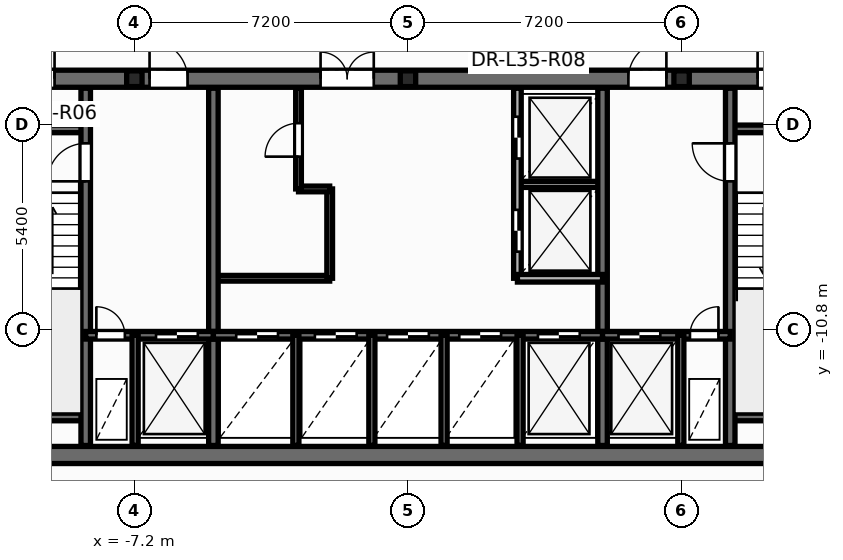
"""IFC4 building model, lengths in metres.
Left out: names, types, materials, properties, quantities, classifications, styles, units other than length and angle.
Written with IfcOpenShell. Run it as: python <this file> out.ifc"""

import sys

from ifc_helpers import new_model, si_unit, direction, frame, frame_2d, origin, origin_2d, place, context, subcontext, project, spatial, rectangle, i_section, extrude, element, fill, save


model = new_model("IFC4")
c1 = context("Model", 3, precision=1e-05, world=origin(), true_north=direction((0.0, 1.0)))
c2 = subcontext(c1, "Body", "Model", "MODEL_VIEW")
j1 = project(units=[si_unit("LENGTHUNIT", "METRE"), si_unit("PLANEANGLEUNIT", "RADIAN")], contexts=[c1])
p1 = place(None, origin())
s1 = spatial("IfcSite", under=j1, at=p1, CompositionType="ELEMENT")
p2 = place(p1, origin())
s2 = spatial("IfcBuilding", under=s1, at=p2, CompositionType="ELEMENT")
p3 = place(p2, frame((0.0, 0.0, 136.5)))
s3 = spatial("IfcBuildingStorey", under=s2, at=p3, CompositionType="ELEMENT", Elevation=136.5)
for number, where, z_axis, x_axis in (
    (1, (-7.2, -4.2, 0.0), (0.0, 0.0, 1.0), (1.0, 0.0, 0.0)),
    (2, (0.0, -4.2, 0.0), (0.0, 0.0, 1.0), (1.0, 0.0, 0.0)),
    (3, (7.2, -4.2, 0.0), (0.0, 0.0, 1.0), (1.0, 0.0, 0.0)),
):
    element("IfcColumn", number, at=place(p3, frame(where, z_axis=z_axis, x_axis=x_axis)), inside=s3, PredefinedType="PILASTER", context=c2, shape_type="SweptSolid", body=[
        extrude(i_section(OverallWidth=0.405, OverallDepth=0.414, WebThickness=0.022, FlangeThickness=0.032, at=origin_2d()), origin(), (0.0, 0.0, 1.0), 3.6),
    ])
p4 = place(p3, frame((-5.12, -9.45, 0.0), z_axis=(0.0, 0.0, 1.0), x_axis=(1.0, 0.0, 0.0)))
e4 = element("IfcWall", 4, at=p4, inside=s3, PredefinedType="PARTITIONING", context=c2, shape_type="SweptSolid", body=[
    extrude(rectangle(XDim=3.06, YDim=0.15, at=frame_2d((1.53, 0.0))), origin(), (0.0, 0.0, 1.0), 3.35),
])
p5 = place(p3, frame((-2.06, -9.45, 0.0), z_axis=(0.0, 0.0, 1.0), x_axis=(0.0, 1.0, 0.0)))
e5 = element("IfcWall", 5, at=p5, inside=s3, PredefinedType="PARTITIONING", context=c2, shape_type="SweptSolid", body=[
    extrude(rectangle(XDim=2.35, YDim=0.15, at=frame_2d((1.175, 0.0))), origin(), (0.0, 0.0, 1.0), 3.35),
])
p6 = place(p3, frame((-2.88, -7.1, 0.0), z_axis=(0.0, 0.0, 1.0), x_axis=(1.0, 0.0, 0.0)))
e6 = element("IfcWall", 6, at=p6, inside=s3, PredefinedType="PARTITIONING", context=c2, shape_type="SweptSolid", body=[
    extrude(rectangle(XDim=0.82, YDim=0.15, at=frame_2d((0.41, 0.0))), origin(), (0.0, 0.0, 1.0), 3.35),
])
p7 = place(p3, frame((-2.88, -7.1, 0.0), z_axis=(0.0, 0.0, 1.0), x_axis=(0.0, 1.0, 0.0)))
e7 = element("IfcWall", 7, at=p7, inside=s3, PredefinedType="PARTITIONING", context=c2, shape_type="SweptSolid", body=[
    extrude(rectangle(XDim=2.65, YDim=0.15, at=frame_2d((1.325, 0.0))), origin(), (0.0, 0.0, 1.0), 3.35),
])
p8 = place(p7, frame((0.85, 0.0, 0.0)))
e8 = element("IfcOpeningElement", 8, at=p8, cuts=e7, PredefinedType="OPENING", context=c2, shape_type="SweptSolid", body=[
    extrude(rectangle(XDim=0.886, YDim=2.104, at=frame_2d((0.44, 1.052))), frame((0.0, 0.085, 0.0), z_axis=(0.0, -1.0, 0.0), x_axis=(1.0, 0.0, 0.0)), (0.0, 0.0, 1.0), 0.17),
])
p9 = place(p3, frame((2.88, -6.98, 0.0), z_axis=(0.0, 0.0, 1.0), x_axis=(1.0, 0.0, 0.0)))
e9 = element("IfcWall", 9, at=p9, inside=s3, PredefinedType="PARTITIONING", context=c2, shape_type="SweptSolid", body=[
    extrude(rectangle(XDim=2.24, YDim=0.16, at=frame_2d((1.12, 0.0))), origin(), (0.0, 0.0, 1.0), 3.35),
])
p10 = place(p3, frame((-12.65, -14.1, 0.0), z_axis=(0.0, 0.0, 1.0), x_axis=(1.0, 0.0, 0.0)))
e10 = element("IfcWall", 10, at=p10, inside=s3, PredefinedType="SHEAR", context=c2, shape_type="SweptSolid", body=[
    extrude(rectangle(XDim=25.3, YDim=0.45, at=frame_2d((12.65, 0.0))), origin(), (0.0, 0.0, 1.0), 3.6),
])
p11 = place(p3, frame((-12.65, -4.2, 0.0), z_axis=(0.0, 0.0, 1.0), x_axis=(1.0, 0.0, 0.0)))
e11 = element("IfcWall", 11, at=p11, inside=s3, PredefinedType="SHEAR", context=c2, shape_type="SweptSolid", body=[
    extrude(rectangle(XDim=25.3, YDim=0.45, at=frame_2d((12.65, 0.0))), origin(), (0.0, 0.0, 1.0), 3.6),
])
p12 = place(p11, frame((0.95, 0.0, 0.0)))
e12 = element("IfcOpeningElement", 12, at=p12, cuts=e11, PredefinedType="OPENING", context=c2, shape_type="SweptSolid", body=[
    extrude(rectangle(XDim=0.756, YDim=2.054, at=frame_2d((0.375, 1.027))), frame((0.0, 0.235, 0.0), z_axis=(0.0, -1.0, 0.0), x_axis=(1.0, 0.0, 0.0)), (0.0, 0.0, 1.0), 0.47),
])
p13 = place(p11, frame((2.6, 0.0, 0.0)))
e13 = element("IfcOpeningElement", 13, at=p13, cuts=e11, PredefinedType="OPENING", context=c2, shape_type="SweptSolid", body=[
    extrude(rectangle(XDim=0.756, YDim=2.054, at=frame_2d((0.375, 1.027))), frame((0.0, 0.235, 0.0), z_axis=(0.0, -1.0, 0.0), x_axis=(1.0, 0.0, 0.0)), (0.0, 0.0, 1.0), 0.47),
])
p14 = place(p11, frame((21.85, 0.0, 0.0)))
e14 = element("IfcOpeningElement", 14, at=p14, cuts=e11, PredefinedType="OPENING", context=c2, shape_type="SweptSolid", body=[
    extrude(rectangle(XDim=0.756, YDim=2.054, at=frame_2d((0.375, 1.027))), frame((0.0, 0.235, 0.0), z_axis=(0.0, -1.0, 0.0), x_axis=(1.0, 0.0, 0.0)), (0.0, 0.0, 1.0), 0.47),
])
p15 = place(p11, frame((23.5, 0.0, 0.0)))
e15 = element("IfcOpeningElement", 15, at=p15, cuts=e11, PredefinedType="OPENING", context=c2, shape_type="SweptSolid", body=[
    extrude(rectangle(XDim=0.756, YDim=2.054, at=frame_2d((0.375, 1.027))), frame((0.0, 0.235, 0.0), z_axis=(0.0, -1.0, 0.0), x_axis=(1.0, 0.0, 0.0)), (0.0, 0.0, 1.0), 0.47),
])
p16 = place(p11, frame((5.85, 0.0, 0.0)))
e16 = element("IfcOpeningElement", 16, at=p16, cuts=e11, PredefinedType="OPENING", context=c2, shape_type="SweptSolid", body=[
    extrude(rectangle(XDim=1.006, YDim=2.104, at=frame_2d((0.5, 1.052))), frame((0.0, 0.235, 0.0), z_axis=(0.0, -1.0, 0.0), x_axis=(1.0, 0.0, 0.0)), (0.0, 0.0, 1.0), 0.47),
])
p17 = place(p11, frame((10.35, 0.0, 0.0)))
e17 = element("IfcOpeningElement", 17, at=p17, cuts=e11, PredefinedType="OPENING", context=c2, shape_type="SweptSolid", body=[
    extrude(rectangle(XDim=1.406, YDim=2.154, at=frame_2d((0.7, 1.077))), frame((0.0, 0.235, 0.0), z_axis=(0.0, -1.0, 0.0), x_axis=(1.0, 0.0, 0.0)), (0.0, 0.0, 1.0), 0.47),
])
p18 = place(p11, frame((18.45, 0.0, 0.0)))
e18 = element("IfcOpeningElement", 18, at=p18, cuts=e11, PredefinedType="OPENING", context=c2, shape_type="SweptSolid", body=[
    extrude(rectangle(XDim=1.006, YDim=2.104, at=frame_2d((0.5, 1.052))), frame((0.0, 0.235, 0.0), z_axis=(0.0, -1.0, 0.0), x_axis=(1.0, 0.0, 0.0)), (0.0, 0.0, 1.0), 0.47),
])
for number, where, z_axis, x_axis in (
    (19, (-12.35, -5.52, 0.0), (0.0, 0.0, 1.0), (1.0, 0.0, 0.0)),
    (20, (-12.35, -13.1, 0.0), (0.0, 0.0, 1.0), (1.0, 0.0, 0.0)),
    (21, (8.48, -5.52, 0.0), (0.0, 0.0, 1.0), (1.0, 0.0, 0.0)),
    (22, (8.48, -13.1, 0.0), (0.0, 0.0, 1.0), (1.0, 0.0, 0.0)),
):
    element("IfcWall", number, at=place(p3, frame(where, z_axis=z_axis, x_axis=x_axis)), inside=s3, PredefinedType="SOLIDWALL", context=c2, shape_type="SweptSolid", body=[
        extrude(rectangle(XDim=3.87, YDim=0.2, at=frame_2d((1.935, 0.0))), origin(), (0.0, 0.0, 1.0), 3.6),
    ])
p19 = place(p3, frame((-8.48, -13.85, 0.0), z_axis=(0.0, 0.0, 1.0), x_axis=(0.0, 1.0, 0.0)))
e23 = element("IfcWall", 23, at=p19, inside=s3, PredefinedType="SHEAR", context=c2, shape_type="SweptSolid", body=[
    extrude(rectangle(XDim=9.4, YDim=0.25, at=frame_2d((4.7, 0.0))), origin(), (0.0, 0.0, 1.0), 3.6),
])
p20 = place(p19, frame((6.95, 0.0, 0.0)))
e24 = element("IfcOpeningElement", 24, at=p20, cuts=e23, PredefinedType="OPENING", context=c2, shape_type="SweptSolid", body=[
    extrude(rectangle(XDim=1.006, YDim=2.104, at=frame_2d((0.5, 1.052))), frame((0.0, 0.135, 0.0), z_axis=(0.0, -1.0, 0.0), x_axis=(1.0, 0.0, 0.0)), (0.0, 0.0, 1.0), 0.27),
])
p21 = place(p3, frame((8.48, -13.85, 0.0), z_axis=(0.0, 0.0, 1.0), x_axis=(0.0, 1.0, 0.0)))
e25 = element("IfcWall", 25, at=p21, inside=s3, PredefinedType="SHEAR", context=c2, shape_type="SweptSolid", body=[
    extrude(rectangle(XDim=9.4, YDim=0.25, at=frame_2d((4.7, 0.0))), origin(), (0.0, 0.0, 1.0), 3.6),
])
p22 = place(p21, frame((6.95, 0.0, 0.0)))
e26 = element("IfcOpeningElement", 26, at=p22, cuts=e25, PredefinedType="OPENING", context=c2, shape_type="SweptSolid", body=[
    extrude(rectangle(XDim=1.006, YDim=2.104, at=frame_2d((0.5, 1.052))), frame((0.0, 0.135, 0.0), z_axis=(0.0, -1.0, 0.0), x_axis=(1.0, 0.0, 0.0)), (0.0, 0.0, 1.0), 0.27),
])
for number, where, z_axis, x_axis in (
    (27, (-5.12, -13.85, 0.0), (0.0, 0.0, 1.0), (0.0, 1.0, 0.0)),
    (28, (5.12, -13.85, 0.0), (0.0, 0.0, 1.0), (0.0, 1.0, 0.0)),
):
    element("IfcWall", number, at=place(p3, frame(where, z_axis=z_axis, x_axis=x_axis)), inside=s3, PredefinedType="SHEAR", context=c2, shape_type="SweptSolid", body=[
        extrude(rectangle(XDim=9.4, YDim=0.25, at=frame_2d((4.7, 0.0))), origin(), (0.0, 0.0, 1.0), 3.6),
    ])
p23 = place(p3, frame((-8.48, -10.95, 0.0), z_axis=(0.0, 0.0, 1.0), x_axis=(1.0, 0.0, 0.0)))
e29 = element("IfcWall", 29, at=p23, inside=s3, PredefinedType="SOLIDWALL", context=c2, shape_type="SweptSolid", body=[
    extrude(rectangle(XDim=3.36, YDim=0.2, at=frame_2d((1.68, 0.0))), origin(), (0.0, 0.0, 1.0), 3.6),
])
p24 = place(p23, frame((0.28, 0.0, 0.0)))
e30 = element("IfcOpeningElement", 30, at=p24, cuts=e29, PredefinedType="OPENING", context=c2, shape_type="SweptSolid", body=[
    extrude(rectangle(XDim=0.756, YDim=2.054, at=frame_2d((0.375, 1.027))), frame((0.0, 0.11, 0.0), z_axis=(0.0, -1.0, 0.0), x_axis=(1.0, 0.0, 0.0)), (0.0, 0.0, 1.0), 0.22),
])
p25 = place(p23, frame((1.85, 0.0, 0.0)))
e31 = element("IfcOpeningElement", 31, at=p25, cuts=e29, PredefinedType="OPENING", context=c2, shape_type="SweptSolid", body=[
    extrude(rectangle(XDim=1.106, YDim=2.104, at=frame_2d((0.55, 1.052))), frame((0.0, 0.11, 0.0), z_axis=(0.0, -1.0, 0.0), x_axis=(1.0, 0.0, 0.0)), (0.0, 0.0, 1.0), 0.22),
])
p26 = place(p3, frame((-5.12, -10.95, 0.0), z_axis=(0.0, 0.0, 1.0), x_axis=(1.0, 0.0, 0.0)))
e32 = element("IfcWall", 32, at=p26, inside=s3, PredefinedType="SOLIDWALL", context=c2, shape_type="SweptSolid", body=[
    extrude(rectangle(XDim=10.24, YDim=0.2, at=frame_2d((5.12, 0.0))), origin(), (0.0, 0.0, 1.0), 3.6),
])
p27 = place(p26, frame((0.6, 0.0, 0.0)))
e33 = element("IfcOpeningElement", 33, at=p27, cuts=e32, PredefinedType="OPENING", context=c2, shape_type="SweptSolid", body=[
    extrude(rectangle(XDim=1.106, YDim=2.104, at=frame_2d((0.55, 1.052))), frame((0.0, 0.11, 0.0), z_axis=(0.0, -1.0, 0.0), x_axis=(1.0, 0.0, 0.0)), (0.0, 0.0, 1.0), 0.22),
])
p28 = place(p26, frame((2.67, 0.0, 0.0)))
e34 = element("IfcOpeningElement", 34, at=p28, cuts=e32, PredefinedType="OPENING", context=c2, shape_type="SweptSolid", body=[
    extrude(rectangle(XDim=1.106, YDim=2.104, at=frame_2d((0.55, 1.052))), frame((0.0, 0.11, 0.0), z_axis=(0.0, -1.0, 0.0), x_axis=(1.0, 0.0, 0.0)), (0.0, 0.0, 1.0), 0.22),
])
p29 = place(p26, frame((4.57, 0.0, 0.0)))
e35 = element("IfcOpeningElement", 35, at=p29, cuts=e32, PredefinedType="OPENING", context=c2, shape_type="SweptSolid", body=[
    extrude(rectangle(XDim=1.106, YDim=2.104, at=frame_2d((0.55, 1.052))), frame((0.0, 0.11, 0.0), z_axis=(0.0, -1.0, 0.0), x_axis=(1.0, 0.0, 0.0)), (0.0, 0.0, 1.0), 0.22),
])
p30 = place(p26, frame((6.47, 0.0, 0.0)))
e36 = element("IfcOpeningElement", 36, at=p30, cuts=e32, PredefinedType="OPENING", context=c2, shape_type="SweptSolid", body=[
    extrude(rectangle(XDim=1.106, YDim=2.104, at=frame_2d((0.55, 1.052))), frame((0.0, 0.11, 0.0), z_axis=(0.0, -1.0, 0.0), x_axis=(1.0, 0.0, 0.0)), (0.0, 0.0, 1.0), 0.22),
])
p31 = place(p26, frame((8.54, 0.0, 0.0)))
e37 = element("IfcOpeningElement", 37, at=p31, cuts=e32, PredefinedType="OPENING", context=c2, shape_type="SweptSolid", body=[
    extrude(rectangle(XDim=1.106, YDim=2.104, at=frame_2d((0.55, 1.052))), frame((0.0, 0.11, 0.0), z_axis=(0.0, -1.0, 0.0), x_axis=(1.0, 0.0, 0.0)), (0.0, 0.0, 1.0), 0.22),
])
p32 = place(p3, frame((5.12, -10.95, 0.0), z_axis=(0.0, 0.0, 1.0), x_axis=(1.0, 0.0, 0.0)))
e38 = element("IfcWall", 38, at=p32, inside=s3, PredefinedType="SOLIDWALL", context=c2, shape_type="SweptSolid", body=[
    extrude(rectangle(XDim=3.36, YDim=0.2, at=frame_2d((1.68, 0.0))), origin(), (0.0, 0.0, 1.0), 3.6),
])
p33 = place(p32, frame((0.42, 0.0, 0.0)))
e39 = element("IfcOpeningElement", 39, at=p33, cuts=e38, PredefinedType="OPENING", context=c2, shape_type="SweptSolid", body=[
    extrude(rectangle(XDim=1.106, YDim=2.104, at=frame_2d((0.55, 1.052))), frame((0.0, 0.11, 0.0), z_axis=(0.0, -1.0, 0.0), x_axis=(1.0, 0.0, 0.0)), (0.0, 0.0, 1.0), 0.22),
])
p34 = place(p32, frame((2.3, 0.0, 0.0)))
e40 = element("IfcOpeningElement", 40, at=p34, cuts=e38, PredefinedType="OPENING", context=c2, shape_type="SweptSolid", body=[
    extrude(rectangle(XDim=0.756, YDim=2.054, at=frame_2d((0.375, 1.027))), frame((0.0, 0.11, 0.0), z_axis=(0.0, -1.0, 0.0), x_axis=(1.0, 0.0, 0.0)), (0.0, 0.0, 1.0), 0.22),
])
for number, where, z_axis, x_axis in (
    (41, (-7.18, -13.85, 0.0), (0.0, 0.0, 1.0), (0.0, 1.0, 0.0)),
    (42, (7.18, -13.85, 0.0), (0.0, 0.0, 1.0), (0.0, 1.0, 0.0)),
    (43, (-2.95, -13.85, 0.0), (0.0, 0.0, 1.0), (0.0, 1.0, 0.0)),
    (44, (2.95, -13.85, 0.0), (0.0, 0.0, 1.0), (0.0, 1.0, 0.0)),
):
    element("IfcWall", number, at=place(p3, frame(where, z_axis=z_axis, x_axis=x_axis)), inside=s3, PredefinedType="PARTITIONING", context=c2, shape_type="SweptSolid", body=[
        extrude(rectangle(XDim=2.9, YDim=0.16, at=frame_2d((1.45, 0.0))), origin(), (0.0, 0.0, 1.0), 2.475),
    ])
p35 = place(p3, frame((2.88, -9.45, 0.0), z_axis=(0.0, 0.0, 1.0), x_axis=(0.0, 1.0, 0.0)))
e45 = element("IfcWall", 45, at=p35, inside=s3, PredefinedType="SOLIDWALL", context=c2, shape_type="SweptSolid", body=[
    extrude(rectangle(XDim=5.0, YDim=0.2, at=frame_2d((2.5, 0.0))), origin(), (0.0, 0.0, 1.0), 3.35),
])
p36 = place(p35, frame((0.7, 0.0, 0.0)))
e46 = element("IfcOpeningElement", 46, at=p36, cuts=e45, PredefinedType="OPENING", context=c2, shape_type="SweptSolid", body=[
    extrude(rectangle(XDim=1.106, YDim=2.104, at=frame_2d((0.55, 1.052))), frame((0.0, 0.11, 0.0), z_axis=(0.0, -1.0, 0.0), x_axis=(1.0, 0.0, 0.0)), (0.0, 0.0, 1.0), 0.22),
])
p37 = place(p35, frame((3.15, 0.0, 0.0)))
e47 = element("IfcOpeningElement", 47, at=p37, cuts=e45, PredefinedType="OPENING", context=c2, shape_type="SweptSolid", body=[
    extrude(rectangle(XDim=1.106, YDim=2.104, at=frame_2d((0.55, 1.052))), frame((0.0, 0.11, 0.0), z_axis=(0.0, -1.0, 0.0), x_axis=(1.0, 0.0, 0.0)), (0.0, 0.0, 1.0), 0.22),
])
p38 = place(p3, frame((2.88, -9.45, 0.0), z_axis=(0.0, 0.0, 1.0), x_axis=(1.0, 0.0, 0.0)))
e48 = element("IfcWall", 48, at=p38, inside=s3, PredefinedType="SOLIDWALL", context=c2, shape_type="SweptSolid", body=[
    extrude(rectangle(XDim=2.24, YDim=0.2, at=frame_2d((1.12, 0.0))), origin(), (0.0, 0.0, 1.0), 3.35),
])
for number, where, z_axis, x_axis in (
    (49, (-0.95, -13.85, 0.0), (0.0, 0.0, 1.0), (0.0, 1.0, 0.0)),
    (50, (0.95, -13.85, 0.0), (0.0, 0.0, 1.0), (0.0, 1.0, 0.0)),
):
    element("IfcWall", number, at=place(p3, frame(where, z_axis=z_axis, x_axis=x_axis)), inside=s3, PredefinedType="PARTITIONING", context=c2, shape_type="SweptSolid", body=[
        extrude(rectangle(XDim=2.9, YDim=0.16, at=frame_2d((1.45, 0.0))), origin(), (0.0, 0.0, 1.0), 2.475),
    ])
p39 = place(p8, origin())
e51 = element("IfcDoor", 51, at=p39, inside=s3, OperationType="SINGLE_SWING_LEFT", PredefinedType="DOOR", context=c2, shape_type="SweptSolid", body=[
    extrude(rectangle(XDim=0.88, YDim=2.1, at=frame_2d((0.44, 1.05))), frame((0.0, 0.025, 0.0), z_axis=(0.0, -1.0, 0.0), x_axis=(1.0, 0.0, 0.0)), (0.0, 0.0, 1.0), 0.05),
])
fill(e8, e51)
p40 = place(p36, origin())
e52 = element("IfcDoor", 52, at=p40, inside=s3, OperationType="DOUBLE_DOOR_SLIDING", PredefinedType="DOOR", context=c2, shape_type="SweptSolid", body=[
    extrude(rectangle(XDim=1.1, YDim=2.1, at=frame_2d((0.55, 1.05))), frame((0.0, 0.025, 0.0), z_axis=(0.0, -1.0, 0.0), x_axis=(1.0, 0.0, 0.0)), (0.0, 0.0, 1.0), 0.05),
])
fill(e46, e52)
p41 = place(p37, origin())
e53 = element("IfcDoor", 53, at=p41, inside=s3, OperationType="DOUBLE_DOOR_SLIDING", PredefinedType="DOOR", context=c2, shape_type="SweptSolid", body=[
    extrude(rectangle(XDim=1.1, YDim=2.1, at=frame_2d((0.55, 1.05))), frame((0.0, 0.025, 0.0), z_axis=(0.0, -1.0, 0.0), x_axis=(1.0, 0.0, 0.0)), (0.0, 0.0, 1.0), 0.05),
])
fill(e47, e53)
p42 = place(p20, origin())
e54 = element("IfcDoor", 54, at=p42, inside=s3, OperationType="SINGLE_SWING_LEFT", PredefinedType="DOOR", context=c2, shape_type="SweptSolid", body=[
    extrude(rectangle(XDim=1.0, YDim=2.1, at=frame_2d((0.5, 1.05))), frame((0.0, 0.025, 0.0), z_axis=(0.0, -1.0, 0.0), x_axis=(1.0, 0.0, 0.0)), (0.0, 0.0, 1.0), 0.05),
])
fill(e24, e54)
p43 = place(p22, origin())
e55 = element("IfcDoor", 55, at=p43, inside=s3, OperationType="SINGLE_SWING_RIGHT", PredefinedType="DOOR", context=c2, shape_type="SweptSolid", body=[
    extrude(rectangle(XDim=1.0, YDim=2.1, at=frame_2d((0.5, 1.05))), frame((0.0, 0.025, 0.0), z_axis=(0.0, -1.0, 0.0), x_axis=(1.0, 0.0, 0.0)), (0.0, 0.0, 1.0), 0.05),
])
fill(e26, e55)
p44 = place(p24, origin())
e56 = element("IfcDoor", 56, at=p44, inside=s3, OperationType="SINGLE_SWING_LEFT", PredefinedType="DOOR", context=c2, shape_type="SweptSolid", body=[
    extrude(rectangle(XDim=0.75, YDim=2.05, at=frame_2d((0.375, 1.025))), frame((0.0, 0.025, 0.0), z_axis=(0.0, -1.0, 0.0), x_axis=(1.0, 0.0, 0.0)), (0.0, 0.0, 1.0), 0.05),
])
fill(e30, e56)
p45 = place(p25, origin())
e57 = element("IfcDoor", 57, at=p45, inside=s3, OperationType="DOUBLE_DOOR_SLIDING", PredefinedType="DOOR", context=c2, shape_type="SweptSolid", body=[
    extrude(rectangle(XDim=1.1, YDim=2.1, at=frame_2d((0.55, 1.05))), frame((0.0, 0.025, 0.0), z_axis=(0.0, -1.0, 0.0), x_axis=(1.0, 0.0, 0.0)), (0.0, 0.0, 1.0), 0.05),
])
fill(e31, e57)
p46 = place(p33, origin())
e58 = element("IfcDoor", 58, at=p46, inside=s3, OperationType="DOUBLE_DOOR_SLIDING", PredefinedType="DOOR", context=c2, shape_type="SweptSolid", body=[
    extrude(rectangle(XDim=1.1, YDim=2.1, at=frame_2d((0.55, 1.05))), frame((0.0, 0.025, 0.0), z_axis=(0.0, -1.0, 0.0), x_axis=(1.0, 0.0, 0.0)), (0.0, 0.0, 1.0), 0.05),
])
fill(e39, e58)
p47 = place(p34, origin())
e59 = element("IfcDoor", 59, at=p47, inside=s3, OperationType="SINGLE_SWING_RIGHT", PredefinedType="DOOR", context=c2, shape_type="SweptSolid", body=[
    extrude(rectangle(XDim=0.75, YDim=2.05, at=frame_2d((0.375, 1.025))), frame((0.0, 0.025, 0.0), z_axis=(0.0, -1.0, 0.0), x_axis=(1.0, 0.0, 0.0)), (0.0, 0.0, 1.0), 0.05),
])
fill(e40, e59)
p48 = place(p27, origin())
e60 = element("IfcDoor", 60, at=p48, inside=s3, OperationType="DOUBLE_DOOR_SLIDING", PredefinedType="DOOR", context=c2, shape_type="SweptSolid", body=[
    extrude(rectangle(XDim=1.1, YDim=2.1, at=frame_2d((0.55, 1.05))), frame((0.0, 0.025, 0.0), z_axis=(0.0, -1.0, 0.0), x_axis=(1.0, 0.0, 0.0)), (0.0, 0.0, 1.0), 0.05),
])
fill(e33, e60)
p49 = place(p28, origin())
e61 = element("IfcDoor", 61, at=p49, inside=s3, OperationType="DOUBLE_DOOR_SLIDING", PredefinedType="DOOR", context=c2, shape_type="SweptSolid", body=[
    extrude(rectangle(XDim=1.1, YDim=2.1, at=frame_2d((0.55, 1.05))), frame((0.0, 0.025, 0.0), z_axis=(0.0, -1.0, 0.0), x_axis=(1.0, 0.0, 0.0)), (0.0, 0.0, 1.0), 0.05),
])
fill(e34, e61)
p50 = place(p29, origin())
e62 = element("IfcDoor", 62, at=p50, inside=s3, OperationType="DOUBLE_DOOR_SLIDING", PredefinedType="DOOR", context=c2, shape_type="SweptSolid", body=[
    extrude(rectangle(XDim=1.1, YDim=2.1, at=frame_2d((0.55, 1.05))), frame((0.0, 0.025, 0.0), z_axis=(0.0, -1.0, 0.0), x_axis=(1.0, 0.0, 0.0)), (0.0, 0.0, 1.0), 0.05),
])
fill(e35, e62)
p51 = place(p30, origin())
e63 = element("IfcDoor", 63, at=p51, inside=s3, OperationType="DOUBLE_DOOR_SLIDING", PredefinedType="DOOR", context=c2, shape_type="SweptSolid", body=[
    extrude(rectangle(XDim=1.1, YDim=2.1, at=frame_2d((0.55, 1.05))), frame((0.0, 0.025, 0.0), z_axis=(0.0, -1.0, 0.0), x_axis=(1.0, 0.0, 0.0)), (0.0, 0.0, 1.0), 0.05),
])
fill(e36, e63)
p52 = place(p31, origin())
e64 = element("IfcDoor", 64, at=p52, inside=s3, OperationType="DOUBLE_DOOR_SLIDING", PredefinedType="DOOR", context=c2, shape_type="SweptSolid", body=[
    extrude(rectangle(XDim=1.1, YDim=2.1, at=frame_2d((0.55, 1.05))), frame((0.0, 0.025, 0.0), z_axis=(0.0, -1.0, 0.0), x_axis=(1.0, 0.0, 0.0)), (0.0, 0.0, 1.0), 0.05),
])
fill(e37, e64)
p53 = place(p13, origin())
e65 = element("IfcDoor", 65, at=p53, inside=s3, OperationType="SINGLE_SWING_RIGHT", PredefinedType="DOOR", context=c2, shape_type="SweptSolid", body=[
    extrude(rectangle(XDim=0.75, YDim=2.05, at=frame_2d((0.375, 1.025))), frame((0.0, 0.025, 0.0), z_axis=(0.0, -1.0, 0.0), x_axis=(1.0, 0.0, 0.0)), (0.0, 0.0, 1.0), 0.05),
])
fill(e13, e65)
p54 = place(p14, origin())
e66 = element("IfcDoor", 66, at=p54, inside=s3, OperationType="SINGLE_SWING_LEFT", PredefinedType="DOOR", context=c2, shape_type="SweptSolid", body=[
    extrude(rectangle(XDim=0.75, YDim=2.05, at=frame_2d((0.375, 1.025))), frame((0.0, 0.025, 0.0), z_axis=(0.0, -1.0, 0.0), x_axis=(1.0, 0.0, 0.0)), (0.0, 0.0, 1.0), 0.05),
])
fill(e14, e66)
p55 = place(p16, origin())
e67 = element("IfcDoor", 67, at=p55, inside=s3, OperationType="SINGLE_SWING_LEFT", PredefinedType="DOOR", context=c2, shape_type="SweptSolid", body=[
    extrude(rectangle(XDim=1.0, YDim=2.1, at=frame_2d((0.5, 1.05))), frame((0.0, 0.025, 0.0), z_axis=(0.0, -1.0, 0.0), x_axis=(1.0, 0.0, 0.0)), (0.0, 0.0, 1.0), 0.05),
])
fill(e16, e67)
p56 = place(p17, origin())
e68 = element("IfcDoor", 68, at=p56, inside=s3, OperationType="DOUBLE_DOOR_SINGLE_SWING", PredefinedType="DOOR", context=c2, shape_type="SweptSolid", body=[
    extrude(rectangle(XDim=1.4, YDim=2.15, at=frame_2d((0.7, 1.075))), frame((0.0, 0.025, 0.0), z_axis=(0.0, -1.0, 0.0), x_axis=(1.0, 0.0, 0.0)), (0.0, 0.0, 1.0), 0.05),
])
fill(e17, e68)
p57 = place(p18, origin())
e69 = element("IfcDoor", 69, at=p57, inside=s3, OperationType="SINGLE_SWING_RIGHT", PredefinedType="DOOR", context=c2, shape_type="SweptSolid", body=[
    extrude(rectangle(XDim=1.0, YDim=2.1, at=frame_2d((0.5, 1.05))), frame((0.0, 0.025, 0.0), z_axis=(0.0, -1.0, 0.0), x_axis=(1.0, 0.0, 0.0)), (0.0, 0.0, 1.0), 0.05),
])
fill(e18, e69)
save(model, sys.argv[1])
